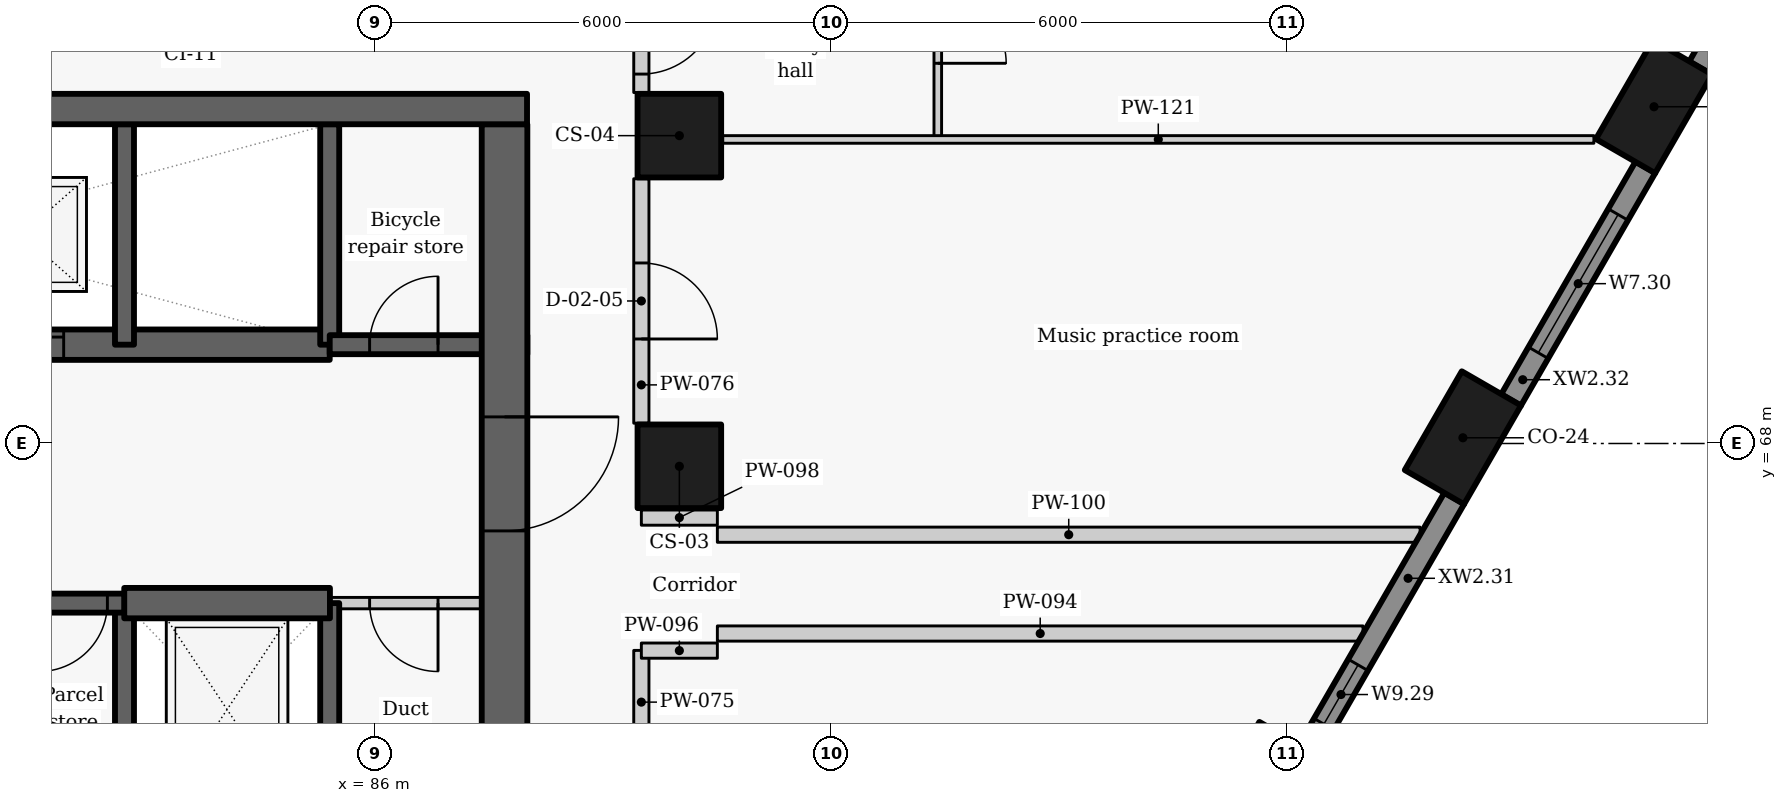
"""IFC4 building model, lengths in metres.
Left out: names, types, materials, properties, quantities, classifications, styles, units other than length and angle.
Written with IfcOpenShell. Run it as: python <this file> out.ifc"""

import sys

from ifc_helpers import new_model, si_unit, direction, frame, frame_2d, origin, origin_2d, place, context, subcontext, project, spatial, rectangle, extrude, element, fill, save


model = new_model("IFC4")
c1 = context("Model", 3, precision=1e-05, world=origin(), true_north=direction((0.0, 1.0)))
c2 = subcontext(c1, "Body", "Model", "MODEL_VIEW")
j1 = project(units=[si_unit("LENGTHUNIT", "METRE"), si_unit("PLANEANGLEUNIT", "RADIAN")], contexts=[c1])
p1 = place(None, origin())
s1 = spatial("IfcSite", under=j1, at=p1, CompositionType="ELEMENT")
p2 = place(p1, origin())
s2 = spatial("IfcBuilding", under=s1, at=p2, CompositionType="ELEMENT")
p3 = place(p2, frame((0.0, 0.0, 44.7)))
s3 = spatial("IfcBuildingStorey", under=s2, at=p3, CompositionType="ELEMENT", Elevation=44.7)
for number, where, z_axis, x_axis in (
    (1, (97.646, 63.463, 0.0), (0.0, 0.0, 1.0), (0.5, 0.866, 0.0)),
    (2, (100.308, 68.075, 0.0), (0.0, 0.0, 1.0), (0.5, 0.866, 0.0)),
    (3, (102.823, 72.43, 0.0), (0.0, 0.0, 1.0), (0.5, 0.866, 0.0)),
):
    element("IfcColumn", number, at=place(p3, frame(where, z_axis=z_axis, x_axis=x_axis)), inside=s3, PredefinedType="COLUMN", context=c2, shape_type="SweptSolid", body=[
        extrude(rectangle(XDim=1.5, YDim=0.9, at=origin_2d()), origin(), (0.0, 0.0, 1.0), 3.3),
    ])
for number, where, z_axis, x_axis in (
    (4, (90.0, 67.7, 0.0), (0.0, 0.0, 1.0), (0.0, 1.0, 0.0)),
    (5, (90.0, 72.05, 0.0), (0.0, 0.0, 1.0), (0.0, 1.0, 0.0)),
):
    element("IfcColumn", number, at=place(p3, frame(where, z_axis=z_axis, x_axis=x_axis)), inside=s3, PredefinedType="COLUMN", context=c2, shape_type="SweptSolid", body=[
        extrude(rectangle(XDim=1.1, YDim=1.1, at=origin_2d()), origin(), (0.0, 0.0, 1.0), 3.3),
    ])
p4 = place(p3, frame((98.278, 63.959, 0.0), z_axis=(0.0, 0.0, 1.0), x_axis=(0.500001735503, 0.866024401789, 0.0)))
e6 = element("IfcWall", 6, at=p4, inside=s3, PredefinedType="SOLIDWALL", context=c2, shape_type="SweptSolid", body=[
    extrude(rectangle(XDim=3.834, YDim=0.3, at=frame_2d((1.917, 0.0))), origin(), (0.0, 0.0, 1.0), 2.425),
])
p5 = place(p4, frame((0.403, 0.0, 0.9)))
e7 = element("IfcOpeningElement", 7, at=p5, cuts=e6, PredefinedType="OPENING", context=c2, shape_type="SweptSolid", body=[
    extrude(rectangle(XDim=0.9, YDim=1.1, at=frame_2d((0.45, 0.55))), frame((0.0, 0.16, 0.0), z_axis=(0.0, -1.0, 0.0), x_axis=(1.0, 0.0, 0.0)), (0.0, 0.0, 1.0), 0.32),
])
p6 = place(p3, frame((100.941, 68.571, 0.0), z_axis=(0.0, 0.0, 1.0), x_axis=(0.499977402622, 0.866038449993, 0.0)))
e8 = element("IfcWall", 8, at=p6, inside=s3, PredefinedType="SOLIDWALL", context=c2, shape_type="SweptSolid", body=[
    extrude(rectangle(XDim=3.537, YDim=0.3, at=frame_2d((1.769, 0.0))), origin(), (0.0, 0.0, 1.0), 2.425),
])
p7 = place(p6, frame((0.719, 0.0, 0.9)))
e9 = element("IfcOpeningElement", 9, at=p7, cuts=e8, PredefinedType="OPENING", context=c2, shape_type="SweptSolid", body=[
    extrude(rectangle(XDim=2.1, YDim=1.1, at=frame_2d((1.05, 0.55))), frame((0.0, 0.16, 0.0), z_axis=(0.0, -1.0, 0.0), x_axis=(1.0, 0.0, 0.0)), (0.0, 0.0, 1.0), 0.32),
])
p8 = place(p3, frame((103.416, 72.949, 0.0), z_axis=(0.0, 0.0, 1.0), x_axis=(0.492363204642, 0.870389840655, 0.0)))
e10 = element("IfcWall", 10, at=p8, inside=s3, PredefinedType="SOLIDWALL", context=c2, shape_type="SweptSolid", body=[
    extrude(rectangle(XDim=5.626, YDim=0.3, at=frame_2d((2.813, 0.0))), origin(), (0.0, 0.0, 1.0), 2.425),
])
p9 = place(p8, frame((0.337, 0.0, 0.9)))
e11 = element("IfcOpeningElement", 11, at=p9, cuts=e10, PredefinedType="OPENING", context=c2, shape_type="SweptSolid", body=[
    extrude(rectangle(XDim=1.5, YDim=1.1, at=frame_2d((0.75, 0.55))), frame((0.0, 0.16, 0.0), z_axis=(0.0, -1.0, 0.0), x_axis=(1.0, 0.0, 0.0)), (0.0, 0.0, 1.0), 0.32),
])
p10 = place(p8, frame((2.562, 0.0, 0.9)))
e12 = element("IfcOpeningElement", 12, at=p10, cuts=e10, PredefinedType="OPENING", context=c2, shape_type="SweptSolid", body=[
    extrude(rectangle(XDim=2.1, YDim=1.1, at=frame_2d((1.05, 0.55))), frame((0.0, 0.16, 0.0), z_axis=(0.0, -1.0, 0.0), x_axis=(1.0, 0.0, 0.0)), (0.0, 0.0, 1.0), 0.32),
])
p11 = place(p3, frame((83.186, 73.881, 0.0), z_axis=(0.0, 0.0, 1.0), x_axis=(-0.972773113459, -0.231759508395, 0.0)))
e13 = element("IfcWall", 13, at=p11, inside=s3, PredefinedType="SOLIDWALL", context=c2, shape_type="SweptSolid", body=[
    extrude(rectangle(XDim=3.246, YDim=0.25, at=frame_2d((1.623, 0.0))), origin(), (0.0, 0.0, 1.0), 2.425),
])
p12 = place(p3, frame((74.6, 69.3, -0.275), z_axis=(0.0, 0.0, 1.0), x_axis=(1.0, 0.0, 0.0)))
e14 = element("IfcWall", 14, at=p12, inside=s3, PredefinedType="SHEAR", context=c2, shape_type="SweptSolid", body=[
    extrude(rectangle(XDim=10.8, YDim=0.4, at=frame_2d((5.4, 0.0))), origin(), (0.0, 0.0, 1.0), 3.3),
])
p13 = place(p12, frame((0.8, 0.0, 0.275)))
e15 = element("IfcOpeningElement", 15, at=p13, cuts=e14, PredefinedType="OPENING", context=c2, shape_type="SweptSolid", body=[
    extrude(rectangle(XDim=1.1, YDim=2.1, at=frame_2d((0.55, 1.05))), frame((0.0, 0.21, 0.0), z_axis=(0.0, -1.0, 0.0), x_axis=(1.0, 0.0, 0.0)), (0.0, 0.0, 1.0), 0.42),
])
p14 = place(p12, frame((3.5, 0.0, 0.275)))
e16 = element("IfcOpeningElement", 16, at=p14, cuts=e14, PredefinedType="OPENING", context=c2, shape_type="SweptSolid", body=[
    extrude(rectangle(XDim=1.1, YDim=2.1, at=frame_2d((0.55, 1.05))), frame((0.0, 0.21, 0.0), z_axis=(0.0, -1.0, 0.0), x_axis=(1.0, 0.0, 0.0)), (0.0, 0.0, 1.0), 0.42),
])
p15 = place(p12, frame((6.2, 0.0, 0.275)))
e17 = element("IfcOpeningElement", 17, at=p15, cuts=e14, PredefinedType="OPENING", context=c2, shape_type="SweptSolid", body=[
    extrude(rectangle(XDim=1.1, YDim=2.1, at=frame_2d((0.55, 1.05))), frame((0.0, 0.21, 0.0), z_axis=(0.0, -1.0, 0.0), x_axis=(1.0, 0.0, 0.0)), (0.0, 0.0, 1.0), 0.42),
])
p16 = place(p3, frame((82.7, 63.1, -0.275), z_axis=(0.0, 0.0, 1.0), x_axis=(0.0, 1.0, 0.0)))
e18 = element("IfcWall", 18, at=p16, inside=s3, PredefinedType="SHEAR", context=c2, shape_type="SweptSolid", body=[
    extrude(rectangle(XDim=2.8, YDim=0.25, at=frame_2d((1.4, 0.0))), origin(), (0.0, 0.0, 1.0), 3.3),
])
p17 = place(p3, frame((82.7, 69.3, -0.275), z_axis=(0.0, 0.0, 1.0), x_axis=(0.0, 1.0, 0.0)))
e19 = element("IfcWall", 19, at=p17, inside=s3, PredefinedType="SHEAR", context=c2, shape_type="SweptSolid", body=[
    extrude(rectangle(XDim=2.9, YDim=0.25, at=frame_2d((1.45, 0.0))), origin(), (0.0, 0.0, 1.0), 3.3),
])
p18 = place(p3, frame((85.4, 63.1, -0.275), z_axis=(0.0, 0.0, 1.0), x_axis=(0.0, 1.0, 0.0)))
e20 = element("IfcWall", 20, at=p18, inside=s3, PredefinedType="SHEAR", context=c2, shape_type="SweptSolid", body=[
    extrude(rectangle(XDim=2.8, YDim=0.25, at=frame_2d((1.4, 0.0))), origin(), (0.0, 0.0, 1.0), 3.3),
])
p19 = place(p3, frame((85.4, 69.3, -0.275), z_axis=(0.0, 0.0, 1.0), x_axis=(0.0, 1.0, 0.0)))
e21 = element("IfcWall", 21, at=p19, inside=s3, PredefinedType="SHEAR", context=c2, shape_type="SweptSolid", body=[
    extrude(rectangle(XDim=2.9, YDim=0.25, at=frame_2d((1.45, 0.0))), origin(), (0.0, 0.0, 1.0), 3.3),
])
p20 = place(p3, frame((85.4, 69.3, -0.275), z_axis=(0.0, 0.0, 1.0), x_axis=(1.0, 0.0, 0.0)))
e22 = element("IfcWall", 22, at=p20, inside=s3, PredefinedType="SHEAR", context=c2, shape_type="SweptSolid", body=[
    extrude(rectangle(XDim=2.6, YDim=0.25, at=frame_2d((1.3, 0.0))), origin(), (0.0, 0.0, 1.0), 3.3),
])
p21 = place(p20, frame((0.525, 0.0, 0.275)))
e23 = element("IfcOpeningElement", 23, at=p21, cuts=e22, PredefinedType="OPENING", context=c2, shape_type="SweptSolid", body=[
    extrude(rectangle(XDim=0.9, YDim=2.1, at=frame_2d((0.45, 1.05))), frame((0.0, 0.135, 0.0), z_axis=(0.0, -1.0, 0.0), x_axis=(1.0, 0.0, 0.0)), (0.0, 0.0, 1.0), 0.27),
])
p22 = place(p3, frame((87.7, 72.2, -0.275), z_axis=(0.0, 0.0, 1.0), x_axis=(0.0, -1.0, 0.0)))
e24 = element("IfcWall", 24, at=p22, inside=s3, PredefinedType="SHEAR", context=c2, shape_type="SweptSolid", body=[
    extrude(rectangle(XDim=15.6, YDim=0.6, at=frame_2d((7.8, 0.0))), origin(), (0.0, 0.0, 1.0), 3.3),
])
p23 = place(p22, frame((3.85, 0.0, 0.275)))
e25 = element("IfcOpeningElement", 25, at=p23, cuts=e24, PredefinedType="OPENING", context=c2, shape_type="SweptSolid", body=[
    extrude(rectangle(XDim=1.5, YDim=2.1, at=frame_2d((0.75, 1.05))), frame((0.0, 0.31, 0.0), z_axis=(0.0, -1.0, 0.0), x_axis=(1.0, 0.0, 0.0)), (0.0, 0.0, 1.0), 0.62),
])
p24 = place(p22, frame((11.8, 0.0, 0.275)))
e26 = element("IfcOpeningElement", 26, at=p24, cuts=e24, PredefinedType="OPENING", context=c2, shape_type="SweptSolid", body=[
    extrude(rectangle(XDim=1.1, YDim=2.1, at=frame_2d((0.55, 1.05))), frame((0.0, 0.31, 0.0), z_axis=(0.0, -1.0, 0.0), x_axis=(1.0, 0.0, 0.0)), (0.0, 0.0, 1.0), 0.62),
])
p25 = place(p3, frame((88.0, 65.9, 0.0), z_axis=(0.0, 0.0, 1.0), x_axis=(-1.0, 0.0, 0.0)))
e27 = element("IfcWall", 27, at=p25, inside=s3, PredefinedType="PARTITIONING", context=c2, shape_type="SweptSolid", body=[
    extrude(rectangle(XDim=2.603, YDim=0.15, at=frame_2d((1.302, 0.0))), origin(), (0.0, 0.0, 1.0), 3.025),
])
p26 = place(p25, frame((1.175, 0.0, 0.0)))
e28 = element("IfcOpeningElement", 28, at=p26, cuts=e27, PredefinedType="OPENING", context=c2, shape_type="SweptSolid", body=[
    extrude(rectangle(XDim=0.9, YDim=2.1, at=frame_2d((0.45, 1.05))), frame((0.0, 0.085, 0.0), z_axis=(0.0, -1.0, 0.0), x_axis=(1.0, 0.0, 0.0)), (0.0, 0.0, 1.0), 0.17),
])
p27 = place(p3, frame((82.703, 65.9, -0.275), z_axis=(0.0, 0.0, 1.0), x_axis=(-1.0, 0.0, 0.0)))
e29 = element("IfcWall", 29, at=p27, inside=s3, PredefinedType="SHEAR", context=c2, shape_type="SweptSolid", body=[
    extrude(rectangle(XDim=2.706, YDim=0.25, at=frame_2d((1.353, 0.0))), origin(), (0.0, 0.0, 1.0), 3.3),
])
p28 = place(p27, frame((1.578, 0.0, 0.275)))
e30 = element("IfcOpeningElement", 30, at=p28, cuts=e29, PredefinedType="OPENING", context=c2, shape_type="SweptSolid", body=[
    extrude(rectangle(XDim=0.9, YDim=2.1, at=frame_2d((0.45, 1.05))), frame((0.0, 0.135, 0.0), z_axis=(0.0, -1.0, 0.0), x_axis=(1.0, 0.0, 0.0)), (0.0, 0.0, 1.0), 0.27),
])
p29 = place(p27, frame((0.228, 0.0, 0.275)))
e31 = element("IfcOpeningElement", 31, at=p29, cuts=e29, PredefinedType="OPENING", context=c2, shape_type="SweptSolid", body=[
    extrude(rectangle(XDim=0.9, YDim=2.1, at=frame_2d((0.45, 1.05))), frame((0.0, 0.135, 0.0), z_axis=(0.0, -1.0, 0.0), x_axis=(1.0, 0.0, 0.0)), (0.0, 0.0, 1.0), 0.27),
])
p30 = place(p3, frame((82.697, 65.9, -0.275), z_axis=(0.0, 0.0, 1.0), x_axis=(1.0, 0.0, 0.0)))
e32 = element("IfcWall", 32, at=p30, inside=s3, PredefinedType="SHEAR", context=c2, shape_type="SweptSolid", body=[
    extrude(rectangle(XDim=2.706, YDim=0.4, at=frame_2d((1.353, 0.0))), origin(), (0.0, 0.0, 1.0), 3.3),
])
p31 = place(p3, frame((89.5, 63.917, 0.0), z_axis=(0.0, 0.0, 1.0), x_axis=(0.0, 1.0, 0.0)))
e33 = element("IfcWall", 33, at=p31, inside=s3, PredefinedType="PARTITIONING", context=c2, shape_type="SweptSolid", body=[
    extrude(rectangle(XDim=1.361, YDim=0.2, at=frame_2d((0.681, 0.0))), origin(), (0.0, 0.0, 1.0), 3.025),
])
p32 = place(p3, frame((89.5, 71.483, 0.0), z_axis=(0.0, 0.0, 1.0), x_axis=(0.0, -1.0, 0.0)))
e34 = element("IfcWall", 34, at=p32, inside=s3, PredefinedType="PARTITIONING", context=c2, shape_type="SweptSolid", body=[
    extrude(rectangle(XDim=3.216, YDim=0.2, at=frame_2d((1.608, 0.0))), origin(), (0.0, 0.0, 1.0), 3.025),
])
p33 = place(p32, frame((1.108, 0.0, 0.0)))
e35 = element("IfcOpeningElement", 35, at=p33, cuts=e34, PredefinedType="OPENING", context=c2, shape_type="SweptSolid", body=[
    extrude(rectangle(XDim=1.0, YDim=2.1, at=frame_2d((0.5, 1.05))), frame((0.0, 0.11, 0.0), z_axis=(0.0, -1.0, 0.0), x_axis=(1.0, 0.0, 0.0)), (0.0, 0.0, 1.0), 0.22),
])
p34 = place(p3, frame((89.5, 76.783, 0.0), z_axis=(0.0, 0.0, 1.0), x_axis=(0.0, -1.0, 0.0)))
e36 = element("IfcWall", 36, at=p34, inside=s3, PredefinedType="PARTITIONING", context=c2, shape_type="SweptSolid", body=[
    extrude(rectangle(XDim=4.166, YDim=0.2, at=frame_2d((2.083, 0.0))), origin(), (0.0, 0.0, 1.0), 3.025),
])
p35 = place(p34, frame((2.923, 0.0, 0.0)))
e37 = element("IfcOpeningElement", 37, at=p35, cuts=e36, PredefinedType="OPENING", context=c2, shape_type="SweptSolid", body=[
    extrude(rectangle(XDim=1.0, YDim=2.1, at=frame_2d((0.5, 1.05))), frame((0.0, 0.11, 0.0), z_axis=(0.0, -1.0, 0.0), x_axis=(1.0, 0.0, 0.0)), (0.0, 0.0, 1.0), 0.22),
])
p36 = place(p3, frame((90.5, 65.5, 0.0), z_axis=(0.0, 0.0, 1.0), x_axis=(1.0, 0.0, 0.0)))
e38 = element("IfcWall", 38, at=p36, inside=s3, PredefinedType="PARTITIONING", context=c2, shape_type="SweptSolid", body=[
    extrude(rectangle(XDim=8.495, YDim=0.2, at=frame_2d((4.248, 0.0))), origin(), (0.0, 0.0, 1.0), 2.405),
])
for number, where, z_axis, x_axis in (
    (39, (89.5, 65.275, 0.0), (0.0, 0.0, 1.0), (1.0, 0.0, 0.0)),
    (40, (89.5, 67.025, 0.0), (0.0, 0.0, 1.0), (1.0, 0.0, 0.0)),
):
    element("IfcWall", number, at=place(p3, frame(where, z_axis=z_axis, x_axis=x_axis)), inside=s3, PredefinedType="PARTITIONING", context=c2, shape_type="SweptSolid", body=[
        extrude(rectangle(XDim=1.0, YDim=0.2, at=frame_2d((0.5, 0.0))), origin(), (0.0, 0.0, 1.0), 2.505),
    ])
p37 = place(p3, frame((90.5, 66.8, 0.0), z_axis=(0.0, 0.0, 1.0), x_axis=(1.0, 0.0, 0.0)))
e41 = element("IfcWall", 41, at=p37, inside=s3, PredefinedType="PARTITIONING", context=c2, shape_type="SweptSolid", body=[
    extrude(rectangle(XDim=9.245, YDim=0.2, at=frame_2d((4.623, 0.0))), origin(), (0.0, 0.0, 1.0), 2.405),
])
p38 = place(p3, frame((93.4, 90.0, 0.0), z_axis=(0.0, 0.0, 1.0), x_axis=(0.0, -1.0, 0.0)))
e42 = element("IfcWall", 42, at=p38, inside=s3, PredefinedType="PARTITIONING", context=c2, shape_type="SweptSolid", body=[
    extrude(rectangle(XDim=18.0, YDim=0.1, at=frame_2d((9.0, 0.0))), origin(), (0.0, 0.0, 1.0), 3.025),
])
p39 = place(p38, frame((16.098, 0.0, 0.0)))
e43 = element("IfcOpeningElement", 43, at=p39, cuts=e42, PredefinedType="OPENING", context=c2, shape_type="SweptSolid", body=[
    extrude(rectangle(XDim=0.9, YDim=2.1, at=frame_2d((0.45, 1.05))), frame((0.0, 0.06, 0.0), z_axis=(0.0, -1.0, 0.0), x_axis=(1.0, 0.0, 0.0)), (0.0, 0.0, 1.0), 0.12),
])
p40 = place(p38, frame((12.55, 0.0, 0.0)))
e44 = element("IfcOpeningElement", 44, at=p40, cuts=e42, PredefinedType="OPENING", context=c2, shape_type="SweptSolid", body=[
    extrude(rectangle(XDim=0.9, YDim=2.1, at=frame_2d((0.45, 1.05))), frame((0.0, 0.06, 0.0), z_axis=(0.0, -1.0, 0.0), x_axis=(1.0, 0.0, 0.0)), (0.0, 0.0, 1.0), 0.12),
])
p41 = place(p38, frame((9.002, 0.0, 0.0)))
e45 = element("IfcOpeningElement", 45, at=p41, cuts=e42, PredefinedType="OPENING", context=c2, shape_type="SweptSolid", body=[
    extrude(rectangle(XDim=0.9, YDim=2.1, at=frame_2d((0.45, 1.05))), frame((0.0, 0.06, 0.0), z_axis=(0.0, -1.0, 0.0), x_axis=(1.0, 0.0, 0.0)), (0.0, 0.0, 1.0), 0.12),
])
p42 = place(p38, frame((3.55, 0.0, 0.0)))
e46 = element("IfcOpeningElement", 46, at=p42, cuts=e42, PredefinedType="OPENING", context=c2, shape_type="SweptSolid", body=[
    extrude(rectangle(XDim=0.9, YDim=2.1, at=frame_2d((0.45, 1.05))), frame((0.0, 0.06, 0.0), z_axis=(0.0, -1.0, 0.0), x_axis=(1.0, 0.0, 0.0)), (0.0, 0.0, 1.0), 0.12),
])
p43 = place(p3, frame((90.57, 72.0, 0.0), z_axis=(0.0, 0.0, 1.0), x_axis=(1.0, 0.0, 0.0)))
e47 = element("IfcWall", 47, at=p43, inside=s3, PredefinedType="PARTITIONING", context=c2, shape_type="SweptSolid", body=[
    extrude(rectangle(XDim=11.462, YDim=0.1, at=frame_2d((5.731, 0.0))), origin(), (0.0, 0.0, 1.0), 3.025),
])
p44 = place(p3, frame((72.004, 72.4, -0.275), z_axis=(0.0, 0.0, 1.0), x_axis=(1.0, 0.0, 0.0)))
e48 = element("IfcWall", 48, at=p44, inside=s3, PredefinedType="SHEAR", context=c2, shape_type="SweptSolid", body=[
    extrude(rectangle(XDim=15.992, YDim=0.4, at=frame_2d((7.996, 0.0))), origin(), (0.0, 0.0, 1.0), 3.3),
])
p45 = place(p5, origin())
e49 = element("IfcWindow", 49, at=p45, inside=s3, PartitioningType="SINGLE_PANEL", PredefinedType="WINDOW", context=c2, shape_type="SweptSolid", body=[
    extrude(rectangle(XDim=0.9, YDim=1.1, at=frame_2d((0.45, 0.55))), frame((0.0, 0.03, 0.0), z_axis=(0.0, -1.0, 0.0), x_axis=(1.0, 0.0, 0.0)), (0.0, 0.0, 1.0), 0.06),
])
fill(e7, e49)
p46 = place(p7, origin())
e50 = element("IfcWindow", 50, at=p46, inside=s3, PartitioningType="SINGLE_PANEL", PredefinedType="WINDOW", context=c2, shape_type="SweptSolid", body=[
    extrude(rectangle(XDim=2.1, YDim=1.1, at=frame_2d((1.05, 0.55))), frame((0.0, 0.03, 0.0), z_axis=(0.0, -1.0, 0.0), x_axis=(1.0, 0.0, 0.0)), (0.0, 0.0, 1.0), 0.06),
])
fill(e9, e50)
p47 = place(p15, origin())
e51 = element("IfcDoor", 51, at=p47, inside=s3, OperationType="SLIDING_TO_LEFT", PredefinedType="DOOR", context=c2, shape_type="SweptSolid", body=[
    extrude(rectangle(XDim=1.1, YDim=2.1, at=frame_2d((0.55, 1.05))), frame((0.0, 0.025, 0.0), z_axis=(0.0, -1.0, 0.0), x_axis=(1.0, 0.0, 0.0)), (0.0, 0.0, 1.0), 0.05),
])
fill(e17, e51)
p48 = place(p21, origin())
e52 = element("IfcDoor", 52, at=p48, inside=s3, OperationType="SINGLE_SWING_RIGHT", PredefinedType="DOOR", context=c2, shape_type="SweptSolid", body=[
    extrude(rectangle(XDim=0.9, YDim=2.1, at=frame_2d((0.45, 1.05))), frame((0.0, 0.025, 0.0), z_axis=(0.0, -1.0, 0.0), x_axis=(1.0, 0.0, 0.0)), (0.0, 0.0, 1.0), 0.05),
])
fill(e23, e52)
p49 = place(p29, origin())
e53 = element("IfcDoor", 53, at=p49, inside=s3, OperationType="SINGLE_SWING_RIGHT", PredefinedType="DOOR", context=c2, shape_type="SweptSolid", body=[
    extrude(rectangle(XDim=0.9, YDim=2.1, at=frame_2d((0.45, 1.05))), frame((0.0, 0.025, 0.0), z_axis=(0.0, -1.0, 0.0), x_axis=(1.0, 0.0, 0.0)), (0.0, 0.0, 1.0), 0.05),
])
fill(e31, e53)
p50 = place(p26, origin())
e54 = element("IfcDoor", 54, at=p50, inside=s3, OperationType="SINGLE_SWING_LEFT", PredefinedType="DOOR", context=c2, shape_type="SweptSolid", body=[
    extrude(rectangle(XDim=0.9, YDim=2.1, at=frame_2d((0.45, 1.05))), frame((0.0, 0.025, 0.0), z_axis=(0.0, -1.0, 0.0), x_axis=(1.0, 0.0, 0.0)), (0.0, 0.0, 1.0), 0.05),
])
fill(e28, e54)
p51 = place(p35, origin())
e55 = element("IfcDoor", 55, at=p51, inside=s3, OperationType="SINGLE_SWING_LEFT", PredefinedType="DOOR", context=c2, shape_type="SweptSolid", body=[
    extrude(rectangle(XDim=1.0, YDim=2.1, at=frame_2d((0.5, 1.05))), frame((0.0, 0.025, 0.0), z_axis=(0.0, -1.0, 0.0), x_axis=(1.0, 0.0, 0.0)), (0.0, 0.0, 1.0), 0.05),
])
fill(e37, e55)
p52 = place(p39, origin())
e56 = element("IfcDoor", 56, at=p52, inside=s3, OperationType="SINGLE_SWING_RIGHT", PredefinedType="DOOR", context=c2, shape_type="SweptSolid", body=[
    extrude(rectangle(XDim=0.9, YDim=2.1, at=frame_2d((0.45, 1.05))), frame((0.0, 0.025, 0.0), z_axis=(0.0, -1.0, 0.0), x_axis=(1.0, 0.0, 0.0)), (0.0, 0.0, 1.0), 0.05),
])
fill(e43, e56)
p53 = place(p33, origin())
e57 = element("IfcDoor", 57, at=p53, inside=s3, OperationType="SINGLE_SWING_RIGHT", PredefinedType="DOOR", context=c2, shape_type="SweptSolid", body=[
    extrude(rectangle(XDim=1.0, YDim=2.1, at=frame_2d((0.5, 1.05))), frame((0.0, 0.025, 0.0), z_axis=(0.0, -1.0, 0.0), x_axis=(1.0, 0.0, 0.0)), (0.0, 0.0, 1.0), 0.05),
])
fill(e35, e57)
p54 = place(p23, origin())
e58 = element("IfcDoor", 58, at=p54, inside=s3, OperationType="DOUBLE_DOOR_SINGLE_SWING", PredefinedType="DOOR", context=c2, shape_type="SweptSolid", body=[
    extrude(rectangle(XDim=1.5, YDim=2.1, at=frame_2d((0.75, 1.05))), frame((0.0, 0.025, 0.0), z_axis=(0.0, -1.0, 0.0), x_axis=(1.0, 0.0, 0.0)), (0.0, 0.0, 1.0), 0.05),
])
fill(e25, e58)
save(model, sys.argv[1])
